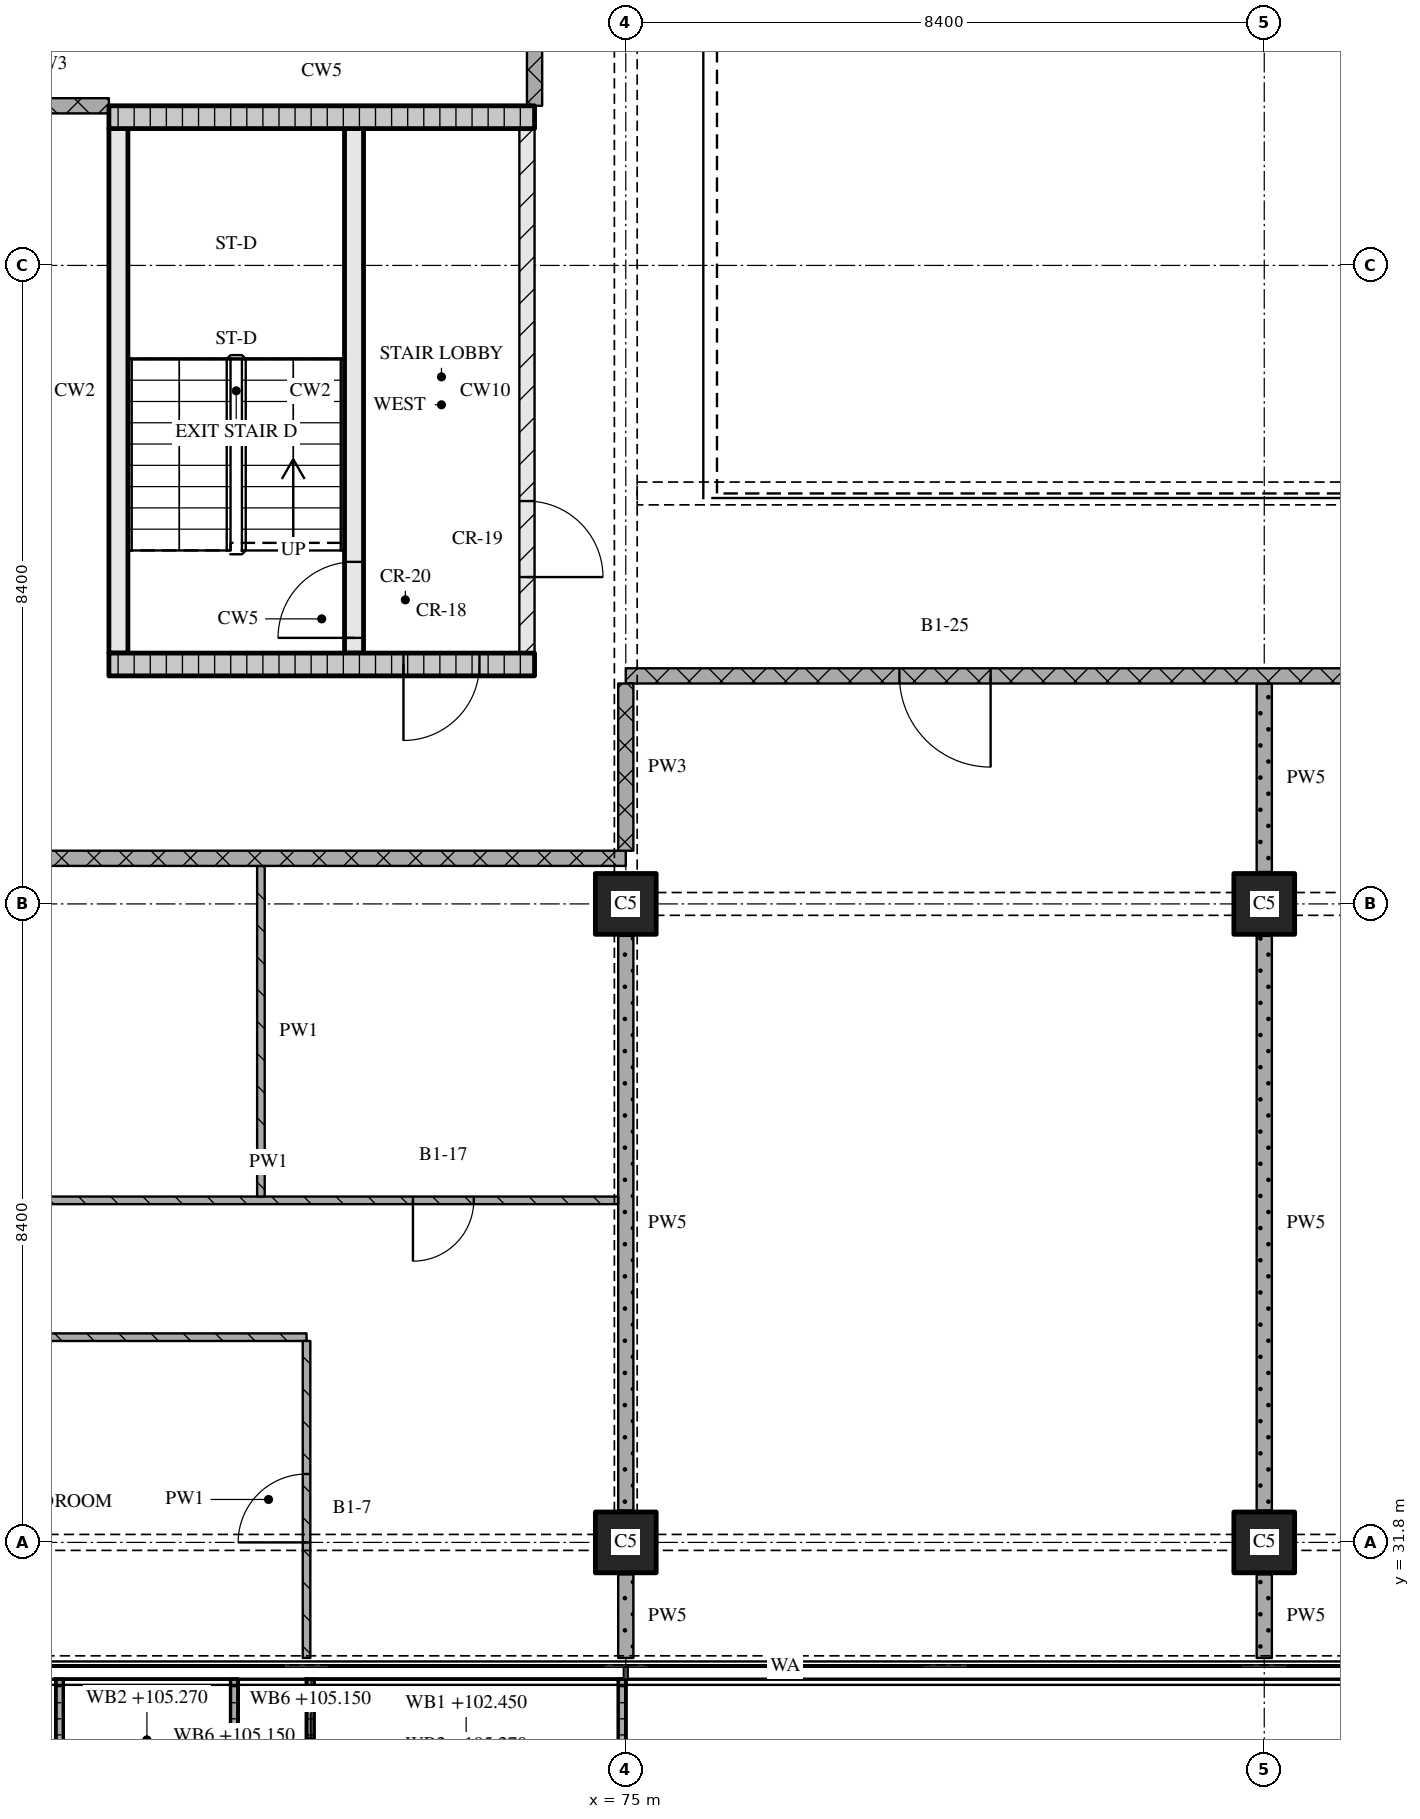
"""IFC4 building model, lengths in metres.
Left out: names, types, materials, properties, quantities, classifications, styles, units other than length and angle.
Written with IfcOpenShell. Run it as: python <this file> out.ifc"""

import sys

from ifc_helpers import new_model, si_unit, direction, frame, frame_2d, origin, origin_2d, place, context, subcontext, project, spatial, polyline, rectangle, outline, extrude, element, fill, save


model = new_model("IFC4")
c1 = context("Model", 3, precision=1e-05, world=origin(), true_north=direction((0.0, 1.0)))
c2 = subcontext(c1, "Body", "Model", "MODEL_VIEW")
j1 = project(units=[si_unit("LENGTHUNIT", "METRE"), si_unit("PLANEANGLEUNIT", "RADIAN")], contexts=[c1])
p1 = place(None, origin())
s1 = spatial("IfcSite", under=j1, at=p1, CompositionType="ELEMENT")
p2 = place(p1, origin())
s2 = spatial("IfcBuilding", under=s1, at=p2, CompositionType="ELEMENT")
p3 = place(p2, frame((0.0, 0.0, 102.45)))
s3 = spatial("IfcBuildingStorey", under=s2, at=p3, CompositionType="ELEMENT", Elevation=102.45)
for number, where, z_axis, x_axis in (
    (1, (75.0, 31.8, 0.0), (0.0, 0.0, 1.0), (1.0, 0.0, 0.0)),
    (2, (75.0, 40.2, 0.0), (0.0, 0.0, 1.0), (1.0, 0.0, 0.0)),
    (3, (83.4, 31.8, 0.0), (0.0, 0.0, 1.0), (1.0, 0.0, 0.0)),
    (4, (83.4, 40.2, 0.0), (0.0, 0.0, 1.0), (1.0, 0.0, 0.0)),
):
    element("IfcColumn", number, at=place(p3, frame(where, z_axis=z_axis, x_axis=x_axis)), inside=s3, PredefinedType="COLUMN", context=c2, shape_type="SweptSolid", body=[
        extrude(rectangle(XDim=0.8, YDim=0.8, at=origin_2d()), origin(), (0.0, 0.0, 1.0), 3.6),
    ])
p4 = place(p3, origin())
e5 = element("IfcWall", 5, at=p4, inside=s3, PredefinedType="SOLIDWALL", context=c2, shape_type="SweptSolid", body=[
    extrude(outline(polyline([(67.5, 30.0), (67.6, 30.0), (67.6, 28.5), (69.8, 28.5), (69.8, 30.0), (69.9, 30.0), (69.9, 28.4), (67.5, 28.4), (67.5, 30.0)])), origin(), (0.0, 0.0, 1.0), 1.0),
])
p5 = place(p3, origin())
e6 = element("IfcWall", 6, at=p5, inside=s3, PredefinedType="SOLIDWALL", context=c2, shape_type="SweptSolid", body=[
    extrude(outline(polyline([(70.8, 30.0), (70.9, 30.0), (70.9, 28.367), (74.9, 28.367), (74.9, 30.0), (75.0, 30.0), (75.0, 28.267), (70.8, 28.267), (70.8, 30.0)])), origin(), (0.0, 0.0, 1.0), 1.0),
])
p6 = place(p3, frame((68.2, 43.35, 0.0), z_axis=(0.0, 0.0, 1.0), x_axis=(1.0, 0.0, 0.0)))
e7 = element("IfcWall", 7, at=p6, inside=s3, PredefinedType="SOLIDWALL", context=c2, shape_type="SweptSolid", body=[
    extrude(rectangle(XDim=5.6, YDim=0.3, at=frame_2d((2.8, 0.0))), origin(), (0.0, 0.0, 1.0), 3.32),
])
p7 = place(p6, frame((3.875, 0.0, 0.0)))
e8 = element("IfcOpeningElement", 8, at=p7, cuts=e7, PredefinedType="OPENING", context=c2, shape_type="SweptSolid", body=[
    extrude(rectangle(XDim=1.0, YDim=2.1, at=frame_2d((0.5, 1.05))), frame((0.0, 0.16, 0.0), z_axis=(0.0, -1.0, 0.0), x_axis=(1.0, 0.0, 0.0)), (0.0, 0.0, 1.0), 0.32),
])
p8 = place(p3, frame((68.325, 43.5, 0.0), z_axis=(0.0, 0.0, 1.0), x_axis=(0.0, 1.0, 0.0)))
e9 = element("IfcWall", 9, at=p8, inside=s3, PredefinedType="SOLIDWALL", context=c2, shape_type="SweptSolid", body=[
    extrude(rectangle(XDim=6.9, YDim=0.25, at=frame_2d((3.45, 0.0))), origin(), (0.0, 0.0, 1.0), 3.32),
])
p9 = place(p3, frame((71.425, 43.5, 0.0), z_axis=(0.0, 0.0, 1.0), x_axis=(0.0, 1.0, 0.0)))
e10 = element("IfcWall", 10, at=p9, inside=s3, PredefinedType="SOLIDWALL", context=c2, shape_type="SweptSolid", body=[
    extrude(rectangle(XDim=6.9, YDim=0.25, at=frame_2d((3.45, 0.0))), origin(), (0.0, 0.0, 1.0), 3.32),
])
p10 = place(p9, frame((0.2, 0.0, 0.0)))
e11 = element("IfcOpeningElement", 11, at=p10, cuts=e10, PredefinedType="OPENING", context=c2, shape_type="SweptSolid", body=[
    extrude(rectangle(XDim=1.0, YDim=2.1, at=frame_2d((0.5, 1.05))), frame((0.0, 0.135, 0.0), z_axis=(0.0, -1.0, 0.0), x_axis=(1.0, 0.0, 0.0)), (0.0, 0.0, 1.0), 0.27),
])
p11 = place(p3, frame((73.7, 43.5, 0.0), z_axis=(0.0, 0.0, 1.0), x_axis=(0.0, 1.0, 0.0)))
e12 = element("IfcWall", 12, at=p11, inside=s3, PredefinedType="PARTITIONING", context=c2, shape_type="SweptSolid", body=[
    extrude(rectangle(XDim=6.9, YDim=0.2, at=frame_2d((3.45, 0.0))), origin(), (0.0, 0.0, 1.0), 3.32),
])
p12 = place(p11, frame((1.0, 0.0, 0.0)))
e13 = element("IfcOpeningElement", 13, at=p12, cuts=e12, PredefinedType="OPENING", context=c2, shape_type="SweptSolid", body=[
    extrude(rectangle(XDim=1.0, YDim=2.1, at=frame_2d((0.5, 1.05))), frame((0.0, 0.11, 0.0), z_axis=(0.0, -1.0, 0.0), x_axis=(1.0, 0.0, 0.0)), (0.0, 0.0, 1.0), 0.22),
])
p13 = place(p3, frame((68.2, 50.55, 0.0), z_axis=(0.0, 0.0, 1.0), x_axis=(1.0, 0.0, 0.0)))
e14 = element("IfcWall", 14, at=p13, inside=s3, PredefinedType="SOLIDWALL", context=c2, shape_type="SweptSolid", body=[
    extrude(rectangle(XDim=5.6, YDim=0.3, at=frame_2d((2.8, 0.0))), origin(), (0.0, 0.0, 1.0), 3.32),
])
p14 = place(p3, frame((70.8, 34.5, 0.0), z_axis=(0.0, 0.0, 1.0), x_axis=(-1.0, 0.0, 0.0)))
e15 = element("IfcWall", 15, at=p14, inside=s3, PredefinedType="PARTITIONING", context=c2, shape_type="SweptSolid", body=[
    extrude(rectangle(XDim=22.52, YDim=0.1, at=frame_2d((11.26, 0.0))), origin(), (0.0, 0.0, 1.0), 3.32),
])
p15 = place(p14, frame((12.15, 0.0, 0.0)))
e16 = element("IfcOpeningElement", 16, at=p15, cuts=e15, PredefinedType="OPENING", context=c2, shape_type="SweptSolid", body=[
    extrude(rectangle(XDim=0.9, YDim=2.1, at=frame_2d((0.45, 1.05))), frame((0.0, 0.06, 0.0), z_axis=(0.0, -1.0, 0.0), x_axis=(1.0, 0.0, 0.0)), (0.0, 0.0, 1.0), 0.12),
])
p16 = place(p14, frame((17.654, 0.0, 0.0)))
e17 = element("IfcOpeningElement", 17, at=p16, cuts=e15, PredefinedType="OPENING", context=c2, shape_type="SweptSolid", body=[
    extrude(rectangle(XDim=0.9, YDim=2.1, at=frame_2d((0.45, 1.05))), frame((0.0, 0.06, 0.0), z_axis=(0.0, -1.0, 0.0), x_axis=(1.0, 0.0, 0.0)), (0.0, 0.0, 1.0), 0.12),
])
p17 = place(p3, frame((65.7, 36.3, 0.0), z_axis=(0.0, 0.0, 1.0), x_axis=(1.0, 0.0, 0.0)))
e18 = element("IfcWall", 18, at=p17, inside=s3, PredefinedType="PARTITIONING", context=c2, shape_type="SweptSolid", body=[
    extrude(rectangle(XDim=9.2, YDim=0.1, at=frame_2d((4.6, 0.0))), origin(), (0.0, 0.0, 1.0), 3.32),
])
p18 = place(p17, frame((6.5, 0.0, 0.0)))
e19 = element("IfcOpeningElement", 19, at=p18, cuts=e18, PredefinedType="OPENING", context=c2, shape_type="SweptSolid", body=[
    extrude(rectangle(XDim=0.8, YDim=2.1, at=frame_2d((0.4, 1.05))), frame((0.0, 0.06, 0.0), z_axis=(0.0, -1.0, 0.0), x_axis=(1.0, 0.0, 0.0)), (0.0, 0.0, 1.0), 0.12),
])
p19 = place(p3, frame((75.0, 40.8, 0.0), z_axis=(0.0, 0.0, 1.0), x_axis=(-1.0, 0.0, 0.0)))
e20 = element("IfcWall", 20, at=p19, inside=s3, PredefinedType="PARTITIONING", context=c2, shape_type="SweptSolid", body=[
    extrude(rectangle(XDim=24.18, YDim=0.2, at=frame_2d((12.09, 0.0))), origin(), (0.0, 0.0, 1.0), 3.32),
])
p20 = place(p19, frame((9.55, 0.0, 0.0)))
e21 = element("IfcOpeningElement", 21, at=p20, cuts=e20, PredefinedType="OPENING", context=c2, shape_type="SweptSolid", body=[
    extrude(rectangle(XDim=1.0, YDim=2.1, at=frame_2d((0.5, 1.05))), frame((0.0, 0.11, 0.0), z_axis=(0.0, -1.0, 0.0), x_axis=(1.0, 0.0, 0.0)), (0.0, 0.0, 1.0), 0.22),
])
p21 = place(p3, frame((100.2, 43.2, 0.0), z_axis=(0.0, 0.0, 1.0), x_axis=(-1.0, 0.0, 0.0)))
e22 = element("IfcWall", 22, at=p21, inside=s3, PredefinedType="PARTITIONING", context=c2, shape_type="SweptSolid", body=[
    extrude(rectangle(XDim=25.2, YDim=0.2, at=frame_2d((12.6, 0.0))), origin(), (0.0, 0.0, 1.0), 3.32),
])
p22 = place(p21, frame((7.8, 0.0, 0.0)))
e23 = element("IfcOpeningElement", 23, at=p22, cuts=e22, PredefinedType="OPENING", context=c2, shape_type="SweptSolid", body=[
    extrude(rectangle(XDim=1.2, YDim=2.1, at=frame_2d((0.6, 1.05))), frame((0.0, 0.11, 0.0), z_axis=(0.0, -1.0, 0.0), x_axis=(1.0, 0.0, 0.0)), (0.0, 0.0, 1.0), 0.22),
])
p23 = place(p21, frame((20.4, 0.0, 0.0)))
e24 = element("IfcOpeningElement", 24, at=p23, cuts=e22, PredefinedType="OPENING", context=c2, shape_type="SweptSolid", body=[
    extrude(rectangle(XDim=1.2, YDim=2.1, at=frame_2d((0.6, 1.05))), frame((0.0, 0.11, 0.0), z_axis=(0.0, -1.0, 0.0), x_axis=(1.0, 0.0, 0.0)), (0.0, 0.0, 1.0), 0.22),
])
p24 = place(p3, frame((66.6, 50.7, 0.0), z_axis=(0.0, 0.0, 1.0), x_axis=(1.0, 0.0, 0.0)))
e25 = element("IfcWall", 25, at=p24, inside=s3, PredefinedType="PARTITIONING", context=c2, shape_type="SweptSolid", body=[
    extrude(rectangle(XDim=1.6, YDim=0.2, at=frame_2d((0.8, 0.0))), origin(), (0.0, 0.0, 1.0), 3.32),
])
p25 = place(p3, frame((70.2, 40.7, 0.0), z_axis=(0.0, 0.0, 1.0), x_axis=(0.0, -1.0, 0.0)))
e26 = element("IfcWall", 26, at=p25, inside=s3, PredefinedType="PARTITIONING", context=c2, shape_type="SweptSolid", body=[
    extrude(rectangle(XDim=4.35, YDim=0.1, at=frame_2d((2.175, 0.0))), origin(), (0.0, 0.0, 1.0), 3.32),
])
p26 = place(p3, frame((70.8, 30.28, 0.0), z_axis=(0.0, 0.0, 1.0), x_axis=(0.0, 1.0, 0.0)))
e27 = element("IfcWall", 27, at=p26, inside=s3, PredefinedType="PARTITIONING", context=c2, shape_type="SweptSolid", body=[
    extrude(rectangle(XDim=4.17, YDim=0.1, at=frame_2d((2.085, 0.0))), origin(), (0.0, 0.0, 1.0), 3.32),
])
p27 = place(p26, frame((1.52, 0.0, 0.0)))
e28 = element("IfcOpeningElement", 28, at=p27, cuts=e27, PredefinedType="OPENING", context=c2, shape_type="SweptSolid", body=[
    extrude(rectangle(XDim=0.9, YDim=2.1, at=frame_2d((0.45, 1.05))), frame((0.0, 0.06, 0.0), z_axis=(0.0, -1.0, 0.0), x_axis=(1.0, 0.0, 0.0)), (0.0, 0.0, 1.0), 0.12),
])
p28 = place(p3, frame((73.8, 58.7, 0.0), z_axis=(0.0, 0.0, 1.0), x_axis=(0.0, -1.0, 0.0)))
e29 = element("IfcWall", 29, at=p28, inside=s3, PredefinedType="PARTITIONING", context=c2, shape_type="SweptSolid", body=[
    extrude(rectangle(XDim=8.0, YDim=0.2, at=frame_2d((4.0, 0.0))), origin(), (0.0, 0.0, 1.0), 3.32),
])
p29 = place(p3, frame((75.0, 43.1, 0.0), z_axis=(0.0, 0.0, 1.0), x_axis=(0.0, -1.0, 0.0)))
e30 = element("IfcWall", 30, at=p29, inside=s3, PredefinedType="PARTITIONING", context=c2, shape_type="SweptSolid", body=[
    extrude(rectangle(XDim=2.2, YDim=0.2, at=frame_2d((1.1, 0.0))), origin(), (0.0, 0.0, 1.0), 2.43),
])
p30 = place(p3, frame((75.0, 31.38, 0.0), z_axis=(0.0, 0.0, 1.0), x_axis=(0.0, -1.0, 0.0)))
e31 = element("IfcWall", 31, at=p30, inside=s3, PredefinedType="PARTITIONING", context=c2, shape_type="SweptSolid", body=[
    extrude(rectangle(XDim=1.1, YDim=0.2, at=frame_2d((0.55, 0.0))), origin(), (0.0, 0.0, 1.0), 3.32),
])
p31 = place(p3, frame((75.0, 39.78, 0.0), z_axis=(0.0, 0.0, 1.0), x_axis=(0.0, -1.0, 0.0)))
e32 = element("IfcWall", 32, at=p31, inside=s3, PredefinedType="PARTITIONING", context=c2, shape_type="SweptSolid", body=[
    extrude(rectangle(XDim=7.56, YDim=0.2, at=frame_2d((3.78, 0.0))), origin(), (0.0, 0.0, 1.0), 2.83),
])
p32 = place(p3, frame((83.4, 31.38, 0.0), z_axis=(0.0, 0.0, 1.0), x_axis=(0.0, -1.0, 0.0)))
e33 = element("IfcWall", 33, at=p32, inside=s3, PredefinedType="PARTITIONING", context=c2, shape_type="SweptSolid", body=[
    extrude(rectangle(XDim=1.1, YDim=0.2, at=frame_2d((0.55, 0.0))), origin(), (0.0, 0.0, 1.0), 3.32),
])
p33 = place(p3, frame((83.4, 39.78, 0.0), z_axis=(0.0, 0.0, 1.0), x_axis=(0.0, -1.0, 0.0)))
e34 = element("IfcWall", 34, at=p33, inside=s3, PredefinedType="PARTITIONING", context=c2, shape_type="SweptSolid", body=[
    extrude(rectangle(XDim=7.56, YDim=0.2, at=frame_2d((3.78, 0.0))), origin(), (0.0, 0.0, 1.0), 3.32),
])
p34 = place(p3, frame((83.4, 43.1, 0.0), z_axis=(0.0, 0.0, 1.0), x_axis=(0.0, -1.0, 0.0)))
e35 = element("IfcWall", 35, at=p34, inside=s3, PredefinedType="PARTITIONING", context=c2, shape_type="SweptSolid", body=[
    extrude(rectangle(XDim=2.48, YDim=0.2, at=frame_2d((1.24, 0.0))), origin(), (0.0, 0.0, 1.0), 3.32),
])
p35 = place(p7, origin())
e36 = element("IfcDoor", 36, at=p35, inside=s3, OperationType="SINGLE_SWING_RIGHT", PredefinedType="DOOR", context=c2, shape_type="SweptSolid", body=[
    extrude(rectangle(XDim=1.0, YDim=2.1, at=frame_2d((0.5, 1.05))), frame((0.0, 0.025, 0.0), z_axis=(0.0, -1.0, 0.0), x_axis=(1.0, 0.0, 0.0)), (0.0, 0.0, 1.0), 0.05),
])
fill(e8, e36)
p36 = place(p10, origin())
e37 = element("IfcDoor", 37, at=p36, inside=s3, OperationType="SINGLE_SWING_LEFT", PredefinedType="DOOR", context=c2, shape_type="SweptSolid", body=[
    extrude(rectangle(XDim=1.0, YDim=2.1, at=frame_2d((0.5, 1.05))), frame((0.0, 0.025, 0.0), z_axis=(0.0, -1.0, 0.0), x_axis=(1.0, 0.0, 0.0)), (0.0, 0.0, 1.0), 0.05),
])
fill(e11, e37)
p37 = place(p12, origin())
e38 = element("IfcDoor", 38, at=p37, inside=s3, OperationType="SINGLE_SWING_RIGHT", PredefinedType="DOOR", context=c2, shape_type="SweptSolid", body=[
    extrude(rectangle(XDim=1.0, YDim=2.1, at=frame_2d((0.5, 1.05))), frame((0.0, 0.025, 0.0), z_axis=(0.0, -1.0, 0.0), x_axis=(1.0, 0.0, 0.0)), (0.0, 0.0, 1.0), 0.05),
])
fill(e13, e38)
p38 = place(p18, origin())
e39 = element("IfcDoor", 39, at=p38, inside=s3, OperationType="SINGLE_SWING_RIGHT", PredefinedType="DOOR", context=c2, shape_type="SweptSolid", body=[
    extrude(rectangle(XDim=0.8, YDim=2.1, at=frame_2d((0.4, 1.05))), frame((0.0, 0.025, 0.0), z_axis=(0.0, -1.0, 0.0), x_axis=(1.0, 0.0, 0.0)), (0.0, 0.0, 1.0), 0.05),
])
fill(e19, e39)
p39 = place(p23, origin())
e40 = element("IfcDoor", 40, at=p39, inside=s3, OperationType="SINGLE_SWING_LEFT", PredefinedType="DOOR", context=c2, shape_type="SweptSolid", body=[
    extrude(rectangle(XDim=1.2, YDim=2.1, at=frame_2d((0.6, 1.05))), frame((0.0, 0.025, 0.0), z_axis=(0.0, -1.0, 0.0), x_axis=(1.0, 0.0, 0.0)), (0.0, 0.0, 1.0), 0.05),
])
fill(e24, e40)
p40 = place(p27, origin())
e41 = element("IfcDoor", 41, at=p40, inside=s3, OperationType="SINGLE_SWING_LEFT", PredefinedType="DOOR", context=c2, shape_type="SweptSolid", body=[
    extrude(rectangle(XDim=0.9, YDim=2.1, at=frame_2d((0.45, 1.05))), frame((0.0, 0.025, 0.0), z_axis=(0.0, -1.0, 0.0), x_axis=(1.0, 0.0, 0.0)), (0.0, 0.0, 1.0), 0.05),
])
fill(e28, e41)
save(model, sys.argv[1])
